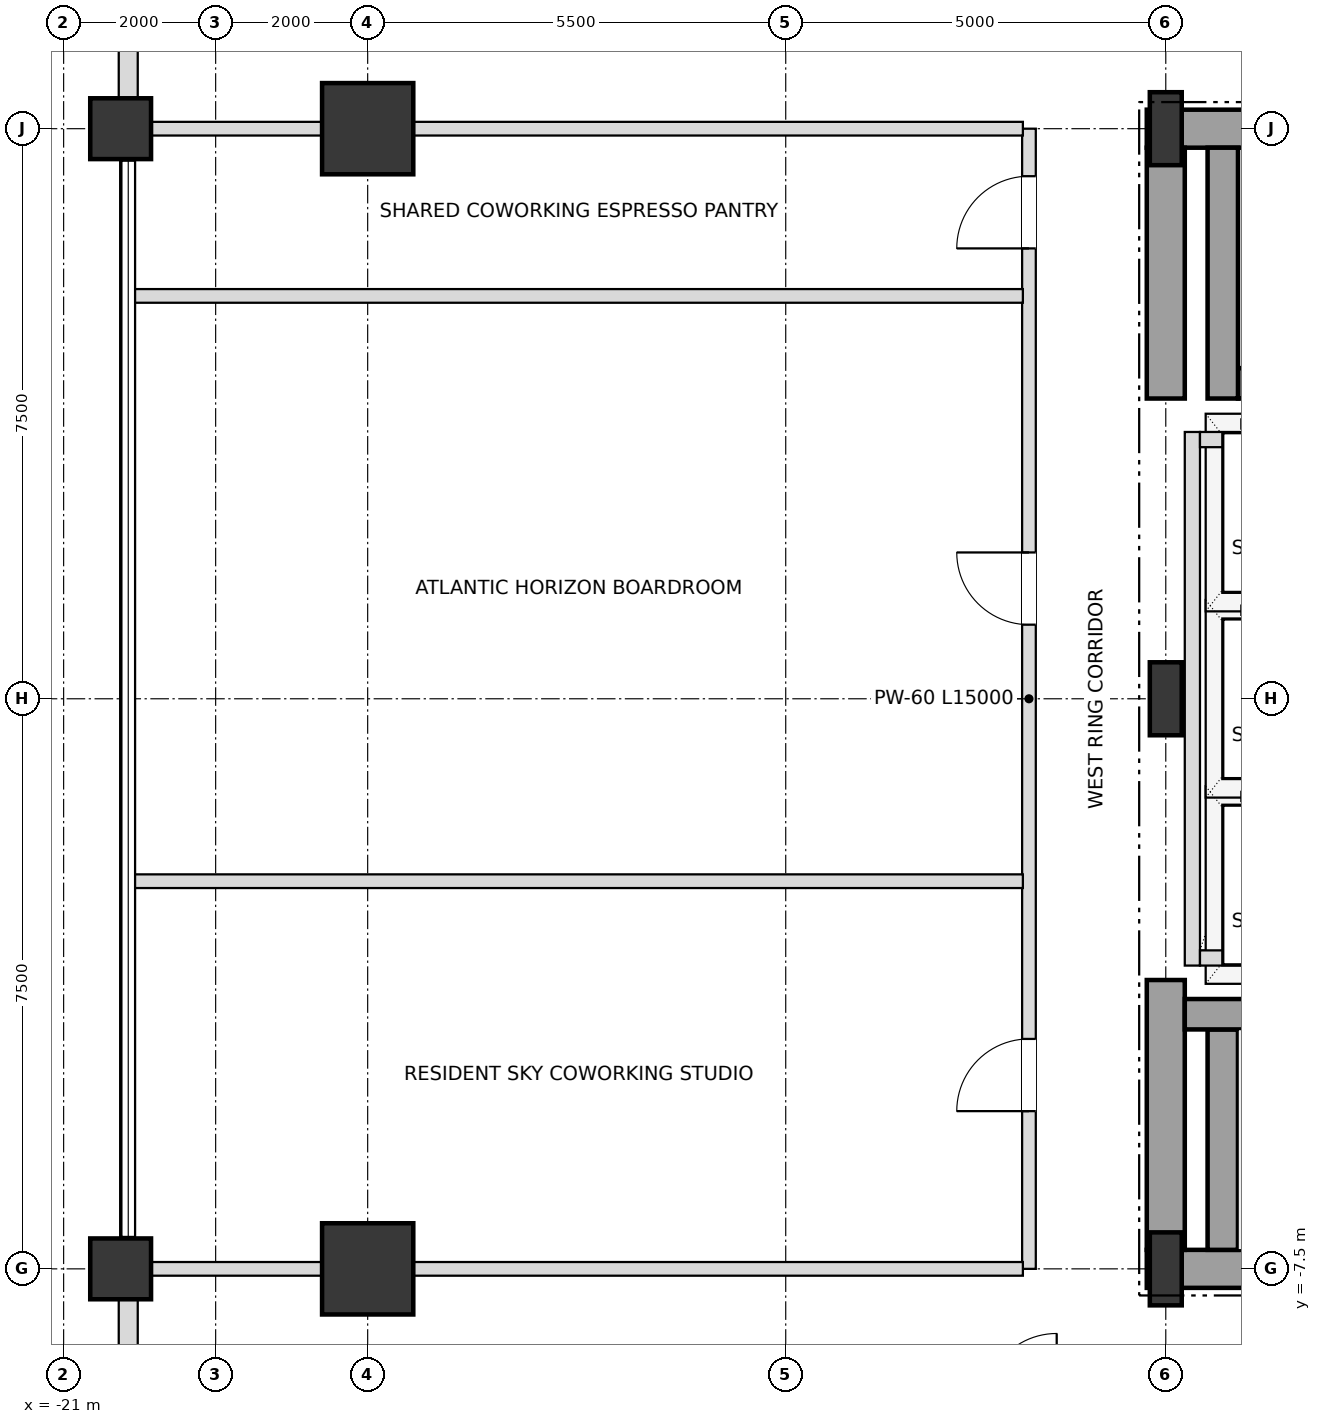
"""IFC4 building model, lengths in metres.
Left out: names, types, materials, properties, quantities, classifications, styles, units other than length and angle.
Written with IfcOpenShell. Run it as: python <this file> out.ifc"""

import sys

from ifc_helpers import new_model, si_unit, direction, frame, frame_2d, origin, origin_2d, place, context, subcontext, project, spatial, rectangle, i_section, extrude, element, fill, save


model = new_model("IFC4")
c1 = context("Model", 3, precision=1e-05, world=origin(), true_north=direction((0.0, 1.0)))
c2 = subcontext(c1, "Body", "Model", "MODEL_VIEW")
j1 = project(units=[si_unit("LENGTHUNIT", "METRE"), si_unit("PLANEANGLEUNIT", "RADIAN")], contexts=[c1])
p1 = place(None, origin())
s1 = spatial("IfcSite", under=j1, at=p1, CompositionType="ELEMENT")
p2 = place(p1, origin())
s2 = spatial("IfcBuilding", under=s1, at=p2, CompositionType="ELEMENT")
p3 = place(p2, frame((0.0, 0.0, 106.2)))
s3 = spatial("IfcBuildingStorey", under=s2, at=p3, CompositionType="ELEMENT", Elevation=106.2)
for number, where, z_axis, x_axis in (
    (1, (-6.5, -7.5, 0.0), (0.0, 0.0, 1.0), (1.0, 0.0, 0.0)),
    (2, (-6.5, 0.0, 0.0), (0.0, 0.0, 1.0), (1.0, 0.0, 0.0)),
    (3, (-6.5, 7.5, 0.0), (0.0, 0.0, 1.0), (1.0, 0.0, 0.0)),
):
    element("IfcColumn", number, at=place(p3, frame(where, z_axis=z_axis, x_axis=x_axis)), inside=s3, PredefinedType="COLUMN", context=c2, shape_type="SweptSolid", body=[
        extrude(i_section(OverallWidth=0.42, OverallDepth=0.96, WebThickness=0.022, FlangeThickness=0.034, at=origin_2d()), origin(), (0.0, 0.0, 1.0), 3.6),
    ])
for number, where, z_axis, x_axis in (
    (4, (-17.0, 7.5, 0.0), (0.0, 0.0, 1.0), (1.0, 0.0, 0.0)),
    (5, (-17.0, -7.5, 0.0), (0.0, 0.0, 1.0), (1.0, 0.0, 0.0)),
):
    element("IfcColumn", number, at=place(p3, frame(where, z_axis=z_axis, x_axis=x_axis)), inside=s3, PredefinedType="USERDEFINED", context=c2, shape_type="SweptSolid", body=[
        extrude(rectangle(XDim=1.2, YDim=1.2, at=origin_2d()), origin(), (0.0, 0.0, 1.0), 3.6),
    ])
for number, where, z_axis, x_axis in (
    (6, (-20.25, -7.5, 0.0), (0.0, 0.0, 1.0), (1.0, 0.0, 0.0)),
    (7, (-20.25, 7.5, 0.0), (0.0, 0.0, 1.0), (1.0, 0.0, 0.0)),
):
    element("IfcColumn", number, at=place(p3, frame(where, z_axis=z_axis, x_axis=x_axis)), inside=s3, PredefinedType="COLUMN", context=c2, shape_type="SweptSolid", body=[
        extrude(rectangle(XDim=0.8, YDim=0.8, at=origin_2d()), origin(), (0.0, 0.0, 1.0), 3.6),
    ])
p4 = place(p3, frame((-20.15, 12.605, 0.0), z_axis=(0.0, 0.0, 1.0), x_axis=(0.0, -1.0, 0.0)))
e8 = element("IfcWall", 8, at=p4, inside=s3, PredefinedType="SOLIDWALL", context=c2, shape_type="SweptSolid", body=[
    extrude(rectangle(XDim=4.71, YDim=0.25, at=frame_2d((2.355, 0.0))), origin(), (0.0, 0.0, 1.0), 2.736),
])
p5 = place(p4, frame((1.455, 0.0, 0.72)))
e9 = element("IfcOpeningElement", 9, at=p5, cuts=e8, PredefinedType="OPENING", context=c2, shape_type="SweptSolid", body=[
    extrude(rectangle(XDim=1.8, YDim=1.68, at=frame_2d((0.9, 0.84))), frame((0.0, 0.135, 0.0), z_axis=(0.0, -1.0, 0.0), x_axis=(1.0, 0.0, 0.0)), (0.0, 0.0, 1.0), 0.27),
])
p6 = place(p3, frame((-20.15, -7.895, 0.0), z_axis=(0.0, 0.0, 1.0), x_axis=(0.0, -1.0, 0.0)))
e10 = element("IfcWall", 10, at=p6, inside=s3, PredefinedType="SOLIDWALL", context=c2, shape_type="SweptSolid", body=[
    extrude(rectangle(XDim=4.71, YDim=0.25, at=frame_2d((2.355, 0.0))), origin(), (0.0, 0.0, 1.0), 2.736),
])
p7 = place(p6, frame((1.455, 0.0, 0.72)))
e11 = element("IfcOpeningElement", 11, at=p7, cuts=e10, PredefinedType="OPENING", context=c2, shape_type="SweptSolid", body=[
    extrude(rectangle(XDim=1.8, YDim=1.68, at=frame_2d((0.9, 0.84))), frame((0.0, 0.135, 0.0), z_axis=(0.0, -1.0, 0.0), x_axis=(1.0, 0.0, 0.0)), (0.0, 0.0, 1.0), 0.27),
])
p8 = place(p3, frame((-6.75, -7.5, 0.0), z_axis=(0.0, 0.0, 1.0), x_axis=(1.0, 0.0, 0.0)))
e12 = element("IfcWall", 12, at=p8, inside=s3, PredefinedType="SHEAR", context=c2, shape_type="SweptSolid", body=[
    extrude(rectangle(XDim=6.75, YDim=0.5, at=frame_2d((3.375, 0.0))), origin(), (0.0, 0.0, 1.0), 3.38),
])
p9 = place(p3, frame((-6.75, 7.5, 0.0), z_axis=(0.0, 0.0, 1.0), x_axis=(1.0, 0.0, 0.0)))
e13 = element("IfcWall", 13, at=p9, inside=s3, PredefinedType="SHEAR", context=c2, shape_type="SweptSolid", body=[
    extrude(rectangle(XDim=6.75, YDim=0.5, at=frame_2d((3.375, 0.0))), origin(), (0.0, 0.0, 1.0), 3.38),
])
p10 = place(p9, frame((1.65, 0.0, 0.0)))
e14 = element("IfcOpeningElement", 14, at=p10, cuts=e13, PredefinedType="OPENING", context=c2, shape_type="SweptSolid", body=[
    extrude(rectangle(XDim=1.05, YDim=2.15, at=frame_2d((0.525, 1.075))), frame((0.0, 0.26, 0.0), z_axis=(0.0, -1.0, 0.0), x_axis=(1.0, 0.0, 0.0)), (0.0, 0.0, 1.0), 0.52),
])
p11 = place(p3, frame((-6.5, -7.25, 0.0), z_axis=(0.0, 0.0, 1.0), x_axis=(0.0, 1.0, 0.0)))
e15 = element("IfcWall", 15, at=p11, inside=s3, PredefinedType="SHEAR", context=c2, shape_type="SweptSolid", body=[
    extrude(rectangle(XDim=3.55, YDim=0.5, at=frame_2d((1.775, 0.0))), origin(), (0.0, 0.0, 1.0), 3.38),
])
p12 = place(p3, frame((-6.5, 3.95, 0.0), z_axis=(0.0, 0.0, 1.0), x_axis=(0.0, 1.0, 0.0)))
e16 = element("IfcWall", 16, at=p12, inside=s3, PredefinedType="SHEAR", context=c2, shape_type="SweptSolid", body=[
    extrude(rectangle(XDim=3.3, YDim=0.5, at=frame_2d((1.65, 0.0))), origin(), (0.0, 0.0, 1.0), 3.38),
])
p13 = place(p3, frame((-5.75, -7.25, 0.0), z_axis=(0.0, 0.0, 1.0), x_axis=(0.0, 1.0, 0.0)))
e17 = element("IfcWall", 17, at=p13, inside=s3, PredefinedType="SHEAR", context=c2, shape_type="SweptSolid", body=[
    extrude(rectangle(XDim=2.9, YDim=0.4, at=frame_2d((1.45, 0.0))), origin(), (0.0, 0.0, 1.0), 3.38),
])
p14 = place(p3, frame((-6.25, -4.15, 0.0), z_axis=(0.0, 0.0, 1.0), x_axis=(1.0, 0.0, 0.0)))
e18 = element("IfcWall", 18, at=p14, inside=s3, PredefinedType="SHEAR", context=c2, shape_type="SweptSolid", body=[
    extrude(rectangle(XDim=7.78, YDim=0.4, at=frame_2d((3.89, 0.0))), origin(), (0.0, 0.0, 1.0), 3.38),
])
p15 = place(p3, frame((-5.55, 4.15, 0.0), z_axis=(0.0, 0.0, 1.0), x_axis=(1.0, 0.0, 0.0)))
e19 = element("IfcWall", 19, at=p15, inside=s3, PredefinedType="SHEAR", context=c2, shape_type="SweptSolid", body=[
    extrude(rectangle(XDim=7.08, YDim=0.4, at=frame_2d((3.54, 0.0))), origin(), (0.0, 0.0, 1.0), 3.38),
])
p16 = place(p3, frame((-5.75, 3.95, 0.0), z_axis=(0.0, 0.0, 1.0), x_axis=(0.0, 1.0, 0.0)))
e20 = element("IfcWall", 20, at=p16, inside=s3, PredefinedType="SHEAR", context=c2, shape_type="SweptSolid", body=[
    extrude(rectangle(XDim=3.3, YDim=0.4, at=frame_2d((1.65, 0.0))), origin(), (0.0, 0.0, 1.0), 3.38),
])
p17 = place(p3, frame((-6.15, -3.51, 0.0), z_axis=(0.0, 0.0, 1.0), x_axis=(0.0, 1.0, 0.0)))
e21 = element("IfcWall", 21, at=p17, inside=s3, PredefinedType="SOLIDWALL", context=c2, shape_type="SweptSolid", body=[
    extrude(rectangle(XDim=7.02, YDim=0.2, at=frame_2d((3.51, 0.0))), origin(), (0.0, 0.0, 1.0), 3.38),
])
for number, where, z_axis, x_axis in (
    (22, (-6.05, -3.41, 0.0), (0.0, 0.0, 1.0), (1.0, 0.0, 0.0)),
    (23, (-6.05, 3.41, 0.0), (0.0, 0.0, 1.0), (1.0, 0.0, 0.0)),
):
    element("IfcWall", number, at=place(p3, frame(where, z_axis=z_axis, x_axis=x_axis)), inside=s3, PredefinedType="SOLIDWALL", context=c2, shape_type="SweptSolid", body=[
        extrude(rectangle(XDim=2.2, YDim=0.2, at=frame_2d((1.1, 0.0))), origin(), (0.0, 0.0, 1.0), 3.38),
    ])
p18 = place(p3, frame((-8.3, -7.5, 0.0), z_axis=(0.0, 0.0, 1.0), x_axis=(0.0, 1.0, 0.0)))
e24 = element("IfcWall", 24, at=p18, inside=s3, PredefinedType="PARTITIONING", context=c2, shape_type="SweptSolid", body=[
    extrude(rectangle(XDim=15.0, YDim=0.18, at=frame_2d((7.5, 0.0))), origin(), (0.0, 0.0, 1.0), 3.38),
])
p19 = place(p18, frame((2.075, 0.0, 0.0)))
e25 = element("IfcOpeningElement", 25, at=p19, cuts=e24, PredefinedType="OPENING", context=c2, shape_type="SweptSolid", body=[
    extrude(rectangle(XDim=0.95, YDim=2.15, at=frame_2d((0.475, 1.075))), frame((0.0, 0.1, 0.0), z_axis=(0.0, -1.0, 0.0), x_axis=(1.0, 0.0, 0.0)), (0.0, 0.0, 1.0), 0.2),
])
p20 = place(p18, frame((8.475, 0.0, 0.0)))
e26 = element("IfcOpeningElement", 26, at=p20, cuts=e24, PredefinedType="OPENING", context=c2, shape_type="SweptSolid", body=[
    extrude(rectangle(XDim=0.95, YDim=2.15, at=frame_2d((0.475, 1.075))), frame((0.0, 0.1, 0.0), z_axis=(0.0, -1.0, 0.0), x_axis=(1.0, 0.0, 0.0)), (0.0, 0.0, 1.0), 0.2),
])
p21 = place(p18, frame((13.425, 0.0, 0.0)))
e27 = element("IfcOpeningElement", 27, at=p21, cuts=e24, PredefinedType="OPENING", context=c2, shape_type="SweptSolid", body=[
    extrude(rectangle(XDim=0.95, YDim=2.15, at=frame_2d((0.475, 1.075))), frame((0.0, 0.1, 0.0), z_axis=(0.0, -1.0, 0.0), x_axis=(1.0, 0.0, 0.0)), (0.0, 0.0, 1.0), 0.2),
])
p22 = place(p3, frame((-20.15, -7.5, 0.0), z_axis=(0.0, 0.0, 1.0), x_axis=(1.0, 0.0, 0.0)))
e28 = element("IfcWall", 28, at=p22, inside=s3, PredefinedType="PARTITIONING", context=c2, shape_type="SweptSolid", body=[
    extrude(rectangle(XDim=11.77, YDim=0.18, at=frame_2d((5.885, 0.0))), origin(), (0.0, 0.0, 1.0), 2.816),
])
for number, where, z_axis, x_axis in (
    (29, (-20.07, -2.4, 0.0), (0.0, 0.0, 1.0), (1.0, 0.0, 0.0)),
    (30, (-20.07, 5.3, 0.0), (0.0, 0.0, 1.0), (1.0, 0.0, 0.0)),
):
    element("IfcWall", number, at=place(p3, frame(where, z_axis=z_axis, x_axis=x_axis)), inside=s3, PredefinedType="PARTITIONING", context=c2, shape_type="SweptSolid", body=[
        extrude(rectangle(XDim=11.69, YDim=0.18, at=frame_2d((5.845, 0.0))), origin(), (0.0, 0.0, 1.0), 2.816),
    ])
p23 = place(p3, frame((-20.15, 7.5, 0.0), z_axis=(0.0, 0.0, 1.0), x_axis=(1.0, 0.0, 0.0)))
e31 = element("IfcWall", 31, at=p23, inside=s3, PredefinedType="PARTITIONING", context=c2, shape_type="SweptSolid", body=[
    extrude(rectangle(XDim=11.77, YDim=0.18, at=frame_2d((5.885, 0.0))), origin(), (0.0, 0.0, 1.0), 2.816),
])
p24 = place(p19, origin())
e32 = element("IfcDoor", 32, at=p24, inside=s3, OperationType="SINGLE_SWING_LEFT", PredefinedType="DOOR", context=c2, shape_type="SweptSolid", body=[
    extrude(rectangle(XDim=0.95, YDim=2.15, at=frame_2d((0.475, 1.075))), frame((0.0, 0.025, 0.0), z_axis=(0.0, -1.0, 0.0), x_axis=(1.0, 0.0, 0.0)), (0.0, 0.0, 1.0), 0.05),
])
fill(e25, e32)
p25 = place(p20, origin())
e33 = element("IfcDoor", 33, at=p25, inside=s3, OperationType="SINGLE_SWING_RIGHT", PredefinedType="DOOR", context=c2, shape_type="SweptSolid", body=[
    extrude(rectangle(XDim=0.95, YDim=2.15, at=frame_2d((0.475, 1.075))), frame((0.0, 0.025, 0.0), z_axis=(0.0, -1.0, 0.0), x_axis=(1.0, 0.0, 0.0)), (0.0, 0.0, 1.0), 0.05),
])
fill(e26, e33)
p26 = place(p21, origin())
e34 = element("IfcDoor", 34, at=p26, inside=s3, OperationType="SINGLE_SWING_LEFT", PredefinedType="DOOR", context=c2, shape_type="SweptSolid", body=[
    extrude(rectangle(XDim=0.95, YDim=2.15, at=frame_2d((0.475, 1.075))), frame((0.0, 0.025, 0.0), z_axis=(0.0, -1.0, 0.0), x_axis=(1.0, 0.0, 0.0)), (0.0, 0.0, 1.0), 0.05),
])
fill(e27, e34)
save(model, sys.argv[1])
